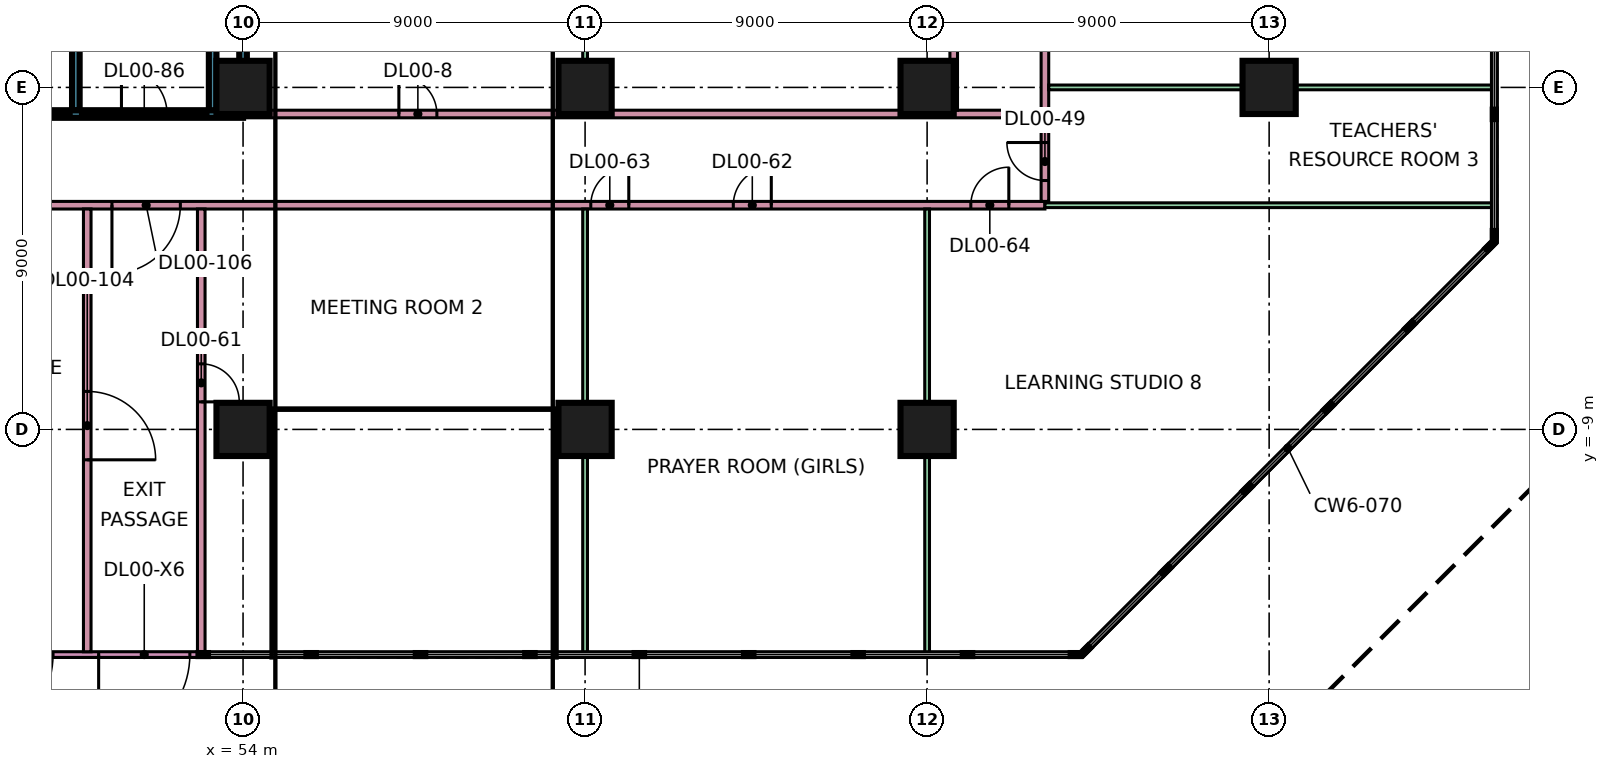
"""IFC4 building model, lengths in metres.
Left out: names, types, materials, properties, quantities, classifications, styles, units other than length and angle.
Written with IfcOpenShell. Run it as: python <this file> out.ifc"""

import sys

from ifc_helpers import new_model, si_unit, direction, frame, frame_2d, origin, origin_2d, place, context, subcontext, project, spatial, rectangle, extrude, element, fill, save


model = new_model("IFC4")
c1 = context("Model", 3, precision=1e-05, world=origin(), true_north=direction((0.0, 1.0)))
c2 = subcontext(c1, "Body", "Model", "MODEL_VIEW")
j1 = project(units=[si_unit("LENGTHUNIT", "METRE"), si_unit("PLANEANGLEUNIT", "RADIAN")], contexts=[c1])
p1 = place(None, origin())
s1 = spatial("IfcSite", under=j1, at=p1, CompositionType="ELEMENT")
p2 = place(p1, origin())
s2 = spatial("IfcBuilding", under=s1, at=p2, CompositionType="ELEMENT")
p3 = place(p2, origin())
s3 = spatial("IfcBuildingStorey", under=s2, at=p3, CompositionType="ELEMENT", Elevation=0.0)
for number, where, z_axis, x_axis in (
    (1, (54.0, -9.0, 0.0), (0.0, 0.0, 1.0), (1.0, 0.0, 0.0)),
    (2, (63.0, -9.0, 0.0), (0.0, 0.0, 1.0), (1.0, 0.0, 0.0)),
    (3, (72.0, -9.0, 0.0), (0.0, 0.0, 1.0), (1.0, 0.0, 0.0)),
    (4, (54.0, 0.0, 0.0), (0.0, 0.0, 1.0), (1.0, 0.0, 0.0)),
    (5, (63.0, 0.0, 0.0), (0.0, 0.0, 1.0), (1.0, 0.0, 0.0)),
    (6, (72.0, 0.0, 0.0), (0.0, 0.0, 1.0), (1.0, 0.0, 0.0)),
    (7, (81.0, 0.0, 0.0), (0.0, 0.0, 1.0), (1.0, 0.0, 0.0)),
):
    element("IfcColumn", number, at=place(p3, frame(where, z_axis=z_axis, x_axis=x_axis)), inside=s3, PredefinedType="COLUMN", context=c2, shape_type="SweptSolid", body=[
        extrude(rectangle(XDim=1.4, YDim=1.4, at=origin_2d()), origin(), (0.0, 0.0, 1.0), 7.2),
    ])
p4 = place(p3, frame((46.3, -14.925, 0.0), z_axis=(0.0, 0.0, 1.0), x_axis=(1.0, 0.0, 0.0)))
e8 = element("IfcWall", 8, at=p4, inside=s3, PredefinedType="SOLIDWALL", context=c2, shape_type="SweptSolid", body=[
    extrude(rectangle(XDim=6.6, YDim=0.15, at=frame_2d((3.3, 0.0))), origin(), (0.0, 0.0, 1.0), 6.8),
])
p5 = place(p4, frame((0.3, 0.0, 0.0)))
e9 = element("IfcOpeningElement", 9, at=p5, cuts=e8, PredefinedType="OPENING", context=c2, shape_type="SweptSolid", body=[
    extrude(rectangle(XDim=2.4, YDim=2.4, at=frame_2d((1.2, 1.2))), frame((0.0, 0.085, 0.0), z_axis=(0.0, -1.0, 0.0), x_axis=(1.0, 0.0, 0.0)), (0.0, 0.0, 1.0), 0.17),
])
p6 = place(p4, frame((3.9, 0.0, 0.0)))
e10 = element("IfcOpeningElement", 10, at=p6, cuts=e8, PredefinedType="OPENING", context=c2, shape_type="SweptSolid", body=[
    extrude(rectangle(XDim=2.4, YDim=2.4, at=frame_2d((1.2, 1.2))), frame((0.0, 0.085, 0.0), z_axis=(0.0, -1.0, 0.0), x_axis=(1.0, 0.0, 0.0)), (0.0, 0.0, 1.0), 0.17),
])
p7 = place(p3, frame((-3.2, -3.1, 0.0), z_axis=(0.0, 0.0, 1.0), x_axis=(1.0, 0.0, 0.0)))
e11 = element("IfcWall", 11, at=p7, inside=s3, PredefinedType="PARTITIONING", context=c2, shape_type="SweptSolid", body=[
    extrude(rectangle(XDim=78.3, YDim=0.2, at=frame_2d((39.15, 0.0))), origin(), (0.0, 0.0, 1.0), 6.8),
])
p8 = place(p7, frame((70.1, 0.0, 0.0)))
e12 = element("IfcOpeningElement", 12, at=p8, cuts=e11, PredefinedType="OPENING", context=c2, shape_type="SweptSolid", body=[
    extrude(rectangle(XDim=1.0, YDim=2.1, at=frame_2d((0.5, 1.05))), frame((0.0, 0.11, 0.0), z_axis=(0.0, -1.0, 0.0), x_axis=(1.0, 0.0, 0.0)), (0.0, 0.0, 1.0), 0.22),
])
p9 = place(p7, frame((66.35, 0.0, 0.0)))
e13 = element("IfcOpeningElement", 13, at=p9, cuts=e11, PredefinedType="OPENING", context=c2, shape_type="SweptSolid", body=[
    extrude(rectangle(XDim=1.0, YDim=2.1, at=frame_2d((0.5, 1.05))), frame((0.0, 0.11, 0.0), z_axis=(0.0, -1.0, 0.0), x_axis=(1.0, 0.0, 0.0)), (0.0, 0.0, 1.0), 0.22),
])
p10 = place(p7, frame((76.35, 0.0, 0.0)))
e14 = element("IfcOpeningElement", 14, at=p10, cuts=e11, PredefinedType="OPENING", context=c2, shape_type="SweptSolid", body=[
    extrude(rectangle(XDim=1.0, YDim=2.1, at=frame_2d((0.5, 1.05))), frame((0.0, 0.11, 0.0), z_axis=(0.0, -1.0, 0.0), x_axis=(1.0, 0.0, 0.0)), (0.0, 0.0, 1.0), 0.22),
])
p11 = place(p7, frame((8.6, 0.0, 0.0)))
e15 = element("IfcOpeningElement", 15, at=p11, cuts=e11, PredefinedType="OPENING", context=c2, shape_type="SweptSolid", body=[
    extrude(rectangle(XDim=1.0, YDim=2.1, at=frame_2d((0.5, 1.05))), frame((0.0, 0.11, 0.0), z_axis=(0.0, -1.0, 0.0), x_axis=(1.0, 0.0, 0.0)), (0.0, 0.0, 1.0), 0.22),
])
p12 = place(p7, frame((3.35, 0.0, 0.0)))
e16 = element("IfcOpeningElement", 16, at=p12, cuts=e11, PredefinedType="OPENING", context=c2, shape_type="SweptSolid", body=[
    extrude(rectangle(XDim=1.0, YDim=2.1, at=frame_2d((0.5, 1.05))), frame((0.0, 0.11, 0.0), z_axis=(0.0, -1.0, 0.0), x_axis=(1.0, 0.0, 0.0)), (0.0, 0.0, 1.0), 0.22),
])
p13 = place(p7, frame((20.6, 0.0, 0.0)))
e17 = element("IfcOpeningElement", 17, at=p13, cuts=e11, PredefinedType="OPENING", context=c2, shape_type="SweptSolid", body=[
    extrude(rectangle(XDim=1.0, YDim=2.1, at=frame_2d((0.5, 1.05))), frame((0.0, 0.11, 0.0), z_axis=(0.0, -1.0, 0.0), x_axis=(1.0, 0.0, 0.0)), (0.0, 0.0, 1.0), 0.22),
])
p14 = place(p7, frame((15.35, 0.0, 0.0)))
e18 = element("IfcOpeningElement", 18, at=p14, cuts=e11, PredefinedType="OPENING", context=c2, shape_type="SweptSolid", body=[
    extrude(rectangle(XDim=1.0, YDim=2.1, at=frame_2d((0.5, 1.05))), frame((0.0, 0.11, 0.0), z_axis=(0.0, -1.0, 0.0), x_axis=(1.0, 0.0, 0.0)), (0.0, 0.0, 1.0), 0.22),
])
p15 = place(p7, frame((32.6, 0.0, 0.0)))
e19 = element("IfcOpeningElement", 19, at=p15, cuts=e11, PredefinedType="OPENING", context=c2, shape_type="SweptSolid", body=[
    extrude(rectangle(XDim=1.0, YDim=2.1, at=frame_2d((0.5, 1.05))), frame((0.0, 0.11, 0.0), z_axis=(0.0, -1.0, 0.0), x_axis=(1.0, 0.0, 0.0)), (0.0, 0.0, 1.0), 0.22),
])
p16 = place(p7, frame((27.35, 0.0, 0.0)))
e20 = element("IfcOpeningElement", 20, at=p16, cuts=e11, PredefinedType="OPENING", context=c2, shape_type="SweptSolid", body=[
    extrude(rectangle(XDim=1.0, YDim=2.1, at=frame_2d((0.5, 1.05))), frame((0.0, 0.11, 0.0), z_axis=(0.0, -1.0, 0.0), x_axis=(1.0, 0.0, 0.0)), (0.0, 0.0, 1.0), 0.22),
])
p17 = place(p7, frame((44.85, 0.0, 0.0)))
e21 = element("IfcOpeningElement", 21, at=p17, cuts=e11, PredefinedType="OPENING", context=c2, shape_type="SweptSolid", body=[
    extrude(rectangle(XDim=1.8, YDim=2.1, at=frame_2d((0.9, 1.05))), frame((0.0, 0.11, 0.0), z_axis=(0.0, -1.0, 0.0), x_axis=(1.0, 0.0, 0.0)), (0.0, 0.0, 1.0), 0.22),
])
p18 = place(p7, frame((50.15, 0.0, 0.0)))
e22 = element("IfcOpeningElement", 22, at=p18, cuts=e11, PredefinedType="OPENING", context=c2, shape_type="SweptSolid", body=[
    extrude(rectangle(XDim=1.8, YDim=2.1, at=frame_2d((0.9, 1.05))), frame((0.0, 0.11, 0.0), z_axis=(0.0, -1.0, 0.0), x_axis=(1.0, 0.0, 0.0)), (0.0, 0.0, 1.0), 0.22),
])
p19 = place(p7, frame((53.75, 0.0, 0.0)))
e23 = element("IfcOpeningElement", 23, at=p19, cuts=e11, PredefinedType="OPENING", context=c2, shape_type="SweptSolid", body=[
    extrude(rectangle(XDim=1.8, YDim=2.1, at=frame_2d((0.9, 1.05))), frame((0.0, 0.11, 0.0), z_axis=(0.0, -1.0, 0.0), x_axis=(1.0, 0.0, 0.0)), (0.0, 0.0, 1.0), 0.22),
])
p20 = place(p3, frame((45.7, -0.7, 0.0), z_axis=(0.0, 0.0, 1.0), x_axis=(1.0, 0.0, 0.0)))
e24 = element("IfcWall", 24, at=p20, inside=s3, PredefinedType="SOLIDWALL", context=c2, shape_type="SweptSolid", body=[
    extrude(rectangle(XDim=8.3, YDim=0.2, at=frame_2d((4.15, 0.0))), origin(), (0.0, 0.0, 1.0), 6.8),
])
p21 = place(p20, frame((5.1, 0.0, 0.0)))
e25 = element("IfcOpeningElement", 25, at=p21, cuts=e24, PredefinedType="OPENING", context=c2, shape_type="SweptSolid", body=[
    extrude(rectangle(XDim=1.2, YDim=2.1, at=frame_2d((0.6, 1.05))), frame((0.0, 0.11, 0.0), z_axis=(0.0, -1.0, 0.0), x_axis=(1.0, 0.0, 0.0)), (0.0, 0.0, 1.0), 0.22),
])
p22 = place(p20, frame((1.5, 0.0, 0.0)))
e26 = element("IfcOpeningElement", 26, at=p22, cuts=e24, PredefinedType="OPENING", context=c2, shape_type="SweptSolid", body=[
    extrude(rectangle(XDim=1.2, YDim=2.1, at=frame_2d((0.6, 1.05))), frame((0.0, 0.11, 0.0), z_axis=(0.0, -1.0, 0.0), x_axis=(1.0, 0.0, 0.0)), (0.0, 0.0, 1.0), 0.22),
])
p23 = place(p3, frame((49.6, -0.6, 0.0), z_axis=(0.0, 0.0, 1.0), x_axis=(0.0, 1.0, 0.0)))
e27 = element("IfcWall", 27, at=p23, inside=s3, PredefinedType="SOLIDWALL", context=c2, shape_type="SweptSolid", body=[
    extrude(rectangle(XDim=13.1, YDim=0.2, at=frame_2d((6.55, 0.0))), origin(), (0.0, 0.0, 1.0), 6.8),
])
p24 = place(p3, frame((49.9, -14.851, 0.0), z_axis=(0.0, 0.0, 1.0), x_axis=(0.0, 1.0, 0.0)))
e28 = element("IfcWall", 28, at=p24, inside=s3, PredefinedType="PARTITIONING", context=c2, shape_type="SweptSolid", body=[
    extrude(rectangle(XDim=11.651, YDim=0.2, at=frame_2d((5.826, 0.0))), origin(), (0.0, 0.0, 1.0), 6.8),
])
p25 = place(p24, frame((5.051, 0.0, 0.0)))
e29 = element("IfcOpeningElement", 29, at=p25, cuts=e28, PredefinedType="OPENING", context=c2, shape_type="SweptSolid", body=[
    extrude(rectangle(XDim=1.8, YDim=2.1, at=frame_2d((0.9, 1.05))), frame((0.0, 0.11, 0.0), z_axis=(0.0, -1.0, 0.0), x_axis=(1.0, 0.0, 0.0)), (0.0, 0.0, 1.0), 0.22),
])
p26 = place(p3, frame((52.9, -14.925, 0.0), z_axis=(0.0, 0.0, 1.0), x_axis=(0.0, 1.0, 0.0)))
e30 = element("IfcWall", 30, at=p26, inside=s3, PredefinedType="PARTITIONING", context=c2, shape_type="SweptSolid", body=[
    extrude(rectangle(XDim=11.725, YDim=0.2, at=frame_2d((5.863, 0.0))), origin(), (0.0, 0.0, 1.0), 6.8),
])
p27 = place(p26, frame((6.65, 0.0, 0.0)))
e31 = element("IfcOpeningElement", 31, at=p27, cuts=e30, PredefinedType="OPENING", context=c2, shape_type="SweptSolid", body=[
    extrude(rectangle(XDim=1.0, YDim=2.1, at=frame_2d((0.5, 1.05))), frame((0.0, 0.11, 0.0), z_axis=(0.0, -1.0, 0.0), x_axis=(1.0, 0.0, 0.0)), (0.0, 0.0, 1.0), 0.22),
])
p28 = place(p3, frame((54.0, -0.7, 0.0), z_axis=(0.0, 0.0, 1.0), x_axis=(1.0, 0.0, 0.0)))
e32 = element("IfcWall", 32, at=p28, inside=s3, PredefinedType="PARTITIONING", context=c2, shape_type="SweptSolid", body=[
    extrude(rectangle(XDim=21.0, YDim=0.2, at=frame_2d((10.5, 0.0))), origin(), (0.0, 0.0, 1.0), 6.8),
])
p29 = place(p28, frame((4.1, 0.0, 0.0)))
e33 = element("IfcOpeningElement", 33, at=p29, cuts=e32, PredefinedType="OPENING", context=c2, shape_type="SweptSolid", body=[
    extrude(rectangle(XDim=1.0, YDim=2.1, at=frame_2d((0.5, 1.05))), frame((0.0, 0.11, 0.0), z_axis=(0.0, -1.0, 0.0), x_axis=(1.0, 0.0, 0.0)), (0.0, 0.0, 1.0), 0.22),
])
p30 = place(p3, frame((54.0, -0.6, 0.0), z_axis=(0.0, 0.0, 1.0), x_axis=(0.0, 1.0, 0.0)))
e34 = element("IfcWall", 34, at=p30, inside=s3, PredefinedType="SOLIDWALL", context=c2, shape_type="SweptSolid", body=[
    extrude(rectangle(XDim=13.1, YDim=0.2, at=frame_2d((6.55, 0.0))), origin(), (0.0, 0.0, 1.0), 6.8),
])
p31 = place(p3, frame((63.0, -14.925, 0.0), z_axis=(0.0, 0.0, 1.0), x_axis=(0.0, 1.0, 0.0)))
e35 = element("IfcWall", 35, at=p31, inside=s3, PredefinedType="PARTITIONING", context=c2, shape_type="SweptSolid", body=[
    extrude(rectangle(XDim=11.725, YDim=0.125, at=frame_2d((5.863, 0.0))), origin(), (0.0, 0.0, 1.0), 6.8),
])
p32 = place(p3, frame((63.0, -0.6, 0.0), z_axis=(0.0, 0.0, 1.0), x_axis=(0.0, 1.0, 0.0)))
e36 = element("IfcWall", 36, at=p32, inside=s3, PredefinedType="PARTITIONING", context=c2, shape_type="SweptSolid", body=[
    extrude(rectangle(XDim=6.538, YDim=0.125, at=frame_2d((3.269, 0.0))), origin(), (0.0, 0.0, 1.0), 6.8),
])
p33 = place(p3, frame((72.0, -14.925, 0.0), z_axis=(0.0, 0.0, 1.0), x_axis=(0.0, 1.0, 0.0)))
e37 = element("IfcWall", 37, at=p33, inside=s3, PredefinedType="PARTITIONING", context=c2, shape_type="SweptSolid", body=[
    extrude(rectangle(XDim=11.725, YDim=0.125, at=frame_2d((5.863, 0.0))), origin(), (0.0, 0.0, 1.0), 6.8),
])
p34 = place(p3, frame((72.7, -0.6, 0.0), z_axis=(0.0, 0.0, 1.0), x_axis=(0.0, 1.0, 0.0)))
e38 = element("IfcWall", 38, at=p34, inside=s3, PredefinedType="PARTITIONING", context=c2, shape_type="SweptSolid", body=[
    extrude(rectangle(XDim=13.1, YDim=0.2, at=frame_2d((6.55, 0.0))), origin(), (0.0, 0.0, 1.0), 6.8),
])
p35 = place(p34, frame((6.05, 0.0, 0.0)))
e39 = element("IfcOpeningElement", 39, at=p35, cuts=e38, PredefinedType="OPENING", context=c2, shape_type="SweptSolid", body=[
    extrude(rectangle(XDim=1.0, YDim=2.1, at=frame_2d((0.5, 1.05))), frame((0.0, 0.11, 0.0), z_axis=(0.0, -1.0, 0.0), x_axis=(1.0, 0.0, 0.0)), (0.0, 0.0, 1.0), 0.22),
])
p36 = place(p3, frame((75.1, -3.1, 0.0), z_axis=(0.0, 0.0, 1.0), x_axis=(1.0, 0.0, 0.0)))
e40 = element("IfcWall", 40, at=p36, inside=s3, PredefinedType="PARTITIONING", context=c2, shape_type="SweptSolid", body=[
    extrude(rectangle(XDim=11.825, YDim=0.125, at=frame_2d((5.913, 0.0))), origin(), (0.0, 0.0, 1.0), 6.8),
])
p37 = place(p3, frame((75.1, -3.0, 0.0), z_axis=(0.0, 0.0, 1.0), x_axis=(0.0, 1.0, 0.0)))
e41 = element("IfcWall", 41, at=p37, inside=s3, PredefinedType="PARTITIONING", context=c2, shape_type="SweptSolid", body=[
    extrude(rectangle(XDim=30.0, YDim=0.2, at=frame_2d((15.0, 0.0))), origin(), (0.0, 0.0, 1.0), 6.8),
])
p38 = place(p37, frame((0.55, 0.0, 0.0)))
e42 = element("IfcOpeningElement", 42, at=p38, cuts=e41, PredefinedType="OPENING", context=c2, shape_type="SweptSolid", body=[
    extrude(rectangle(XDim=1.0, YDim=2.1, at=frame_2d((0.5, 1.05))), frame((0.0, 0.11, 0.0), z_axis=(0.0, -1.0, 0.0), x_axis=(1.0, 0.0, 0.0)), (0.0, 0.0, 1.0), 0.22),
])
p39 = place(p37, frame((8.4, 0.0, 0.0)))
e43 = element("IfcOpeningElement", 43, at=p39, cuts=e41, PredefinedType="OPENING", context=c2, shape_type="SweptSolid", body=[
    extrude(rectangle(XDim=1.0, YDim=2.1, at=frame_2d((0.5, 1.05))), frame((0.0, 0.11, 0.0), z_axis=(0.0, -1.0, 0.0), x_axis=(1.0, 0.0, 0.0)), (0.0, 0.0, 1.0), 0.22),
])
p40 = place(p37, frame((22.25, 0.0, 0.0)))
e44 = element("IfcOpeningElement", 44, at=p40, cuts=e41, PredefinedType="OPENING", context=c2, shape_type="SweptSolid", body=[
    extrude(rectangle(XDim=1.0, YDim=2.1, at=frame_2d((0.5, 1.05))), frame((0.0, 0.11, 0.0), z_axis=(0.0, -1.0, 0.0), x_axis=(1.0, 0.0, 0.0)), (0.0, 0.0, 1.0), 0.22),
])
p41 = place(p37, frame((28.35, 0.0, 0.0)))
e45 = element("IfcOpeningElement", 45, at=p41, cuts=e41, PredefinedType="OPENING", context=c2, shape_type="SweptSolid", body=[
    extrude(rectangle(XDim=1.0, YDim=2.1, at=frame_2d((0.5, 1.05))), frame((0.0, 0.11, 0.0), z_axis=(0.0, -1.0, 0.0), x_axis=(1.0, 0.0, 0.0)), (0.0, 0.0, 1.0), 0.22),
])
p42 = place(p37, frame((16.25, 0.0, 0.0)))
e46 = element("IfcOpeningElement", 46, at=p42, cuts=e41, PredefinedType="OPENING", context=c2, shape_type="SweptSolid", body=[
    extrude(rectangle(XDim=1.8, YDim=2.1, at=frame_2d((0.9, 1.05))), frame((0.0, 0.11, 0.0), z_axis=(0.0, -1.0, 0.0), x_axis=(1.0, 0.0, 0.0)), (0.0, 0.0, 1.0), 0.22),
])
p43 = place(p3, frame((75.2, 0.0, 0.0), z_axis=(0.0, 0.0, 1.0), x_axis=(1.0, 0.0, 0.0)))
e47 = element("IfcWall", 47, at=p43, inside=s3, PredefinedType="PARTITIONING", context=c2, shape_type="SweptSolid", body=[
    extrude(rectangle(XDim=11.725, YDim=0.125, at=frame_2d((5.863, 0.0))), origin(), (0.0, 0.0, 1.0), 6.8),
])
p44 = place(p3, frame((53.2, -0.6, 0.0), z_axis=(0.0, 0.0, 1.0), x_axis=(0.0, 1.0, 0.0)))
e48 = element("IfcWall", 48, at=p44, inside=s3, PredefinedType="SOLIDWALL", context=c2, shape_type="SweptSolid", body=[
    extrude(rectangle(XDim=5.985, YDim=0.2, at=frame_2d((2.993, 0.0))), origin(), (0.0, 0.0, 1.0), 6.8),
])
p45 = place(p5, frame((2.4, 0.0, 0.0), z_axis=(0.0, 0.0, 1.0), x_axis=(-1.0, 0.0, 0.0)))
e49 = element("IfcDoor", 49, at=p45, inside=s3, OperationType="DOUBLE_DOOR_SINGLE_SWING", PredefinedType="DOOR", context=c2, shape_type="SweptSolid", body=[
    extrude(rectangle(XDim=2.4, YDim=2.4, at=frame_2d((1.2, 1.2))), frame((0.0, 0.025, 0.0), z_axis=(0.0, -1.0, 0.0), x_axis=(1.0, 0.0, 0.0)), (0.0, 0.0, 1.0), 0.05),
])
fill(e9, e49)
p46 = place(p6, frame((2.4, 0.0, 0.0), z_axis=(0.0, 0.0, 1.0), x_axis=(-1.0, 0.0, 0.0)))
e50 = element("IfcDoor", 50, at=p46, inside=s3, OperationType="DOUBLE_DOOR_SINGLE_SWING", PredefinedType="DOOR", context=c2, shape_type="SweptSolid", body=[
    extrude(rectangle(XDim=2.4, YDim=2.4, at=frame_2d((1.2, 1.2))), frame((0.0, 0.025, 0.0), z_axis=(0.0, -1.0, 0.0), x_axis=(1.0, 0.0, 0.0)), (0.0, 0.0, 1.0), 0.05),
])
fill(e10, e50)
p47 = place(p29, origin())
e51 = element("IfcDoor", 51, at=p47, inside=s3, OperationType="SINGLE_SWING_LEFT", PredefinedType="DOOR", context=c2, shape_type="SweptSolid", body=[
    extrude(rectangle(XDim=1.0, YDim=2.1, at=frame_2d((0.5, 1.05))), frame((0.0, 0.025, 0.0), z_axis=(0.0, -1.0, 0.0), x_axis=(1.0, 0.0, 0.0)), (0.0, 0.0, 1.0), 0.05),
])
fill(e33, e51)
p48 = place(p38, frame((1.0, 0.0, 0.0), z_axis=(0.0, 0.0, 1.0), x_axis=(-1.0, 0.0, 0.0)))
e52 = element("IfcDoor", 52, at=p48, inside=s3, OperationType="SINGLE_SWING_RIGHT", PredefinedType="DOOR", context=c2, shape_type="SweptSolid", body=[
    extrude(rectangle(XDim=1.0, YDim=2.1, at=frame_2d((0.5, 1.05))), frame((0.0, 0.025, 0.0), z_axis=(0.0, -1.0, 0.0), x_axis=(1.0, 0.0, 0.0)), (0.0, 0.0, 1.0), 0.05),
])
fill(e42, e52)
p49 = place(p27, frame((1.0, 0.0, 0.0), z_axis=(0.0, 0.0, 1.0), x_axis=(-1.0, 0.0, 0.0)))
e53 = element("IfcDoor", 53, at=p49, inside=s3, OperationType="SINGLE_SWING_LEFT", PredefinedType="DOOR", context=c2, shape_type="SweptSolid", body=[
    extrude(rectangle(XDim=1.0, YDim=2.1, at=frame_2d((0.5, 1.05))), frame((0.0, 0.025, 0.0), z_axis=(0.0, -1.0, 0.0), x_axis=(1.0, 0.0, 0.0)), (0.0, 0.0, 1.0), 0.05),
])
fill(e31, e53)
p50 = place(p8, frame((1.0, 0.0, 0.0), z_axis=(0.0, 0.0, 1.0), x_axis=(-1.0, 0.0, 0.0)))
e54 = element("IfcDoor", 54, at=p50, inside=s3, OperationType="SINGLE_SWING_RIGHT", PredefinedType="DOOR", context=c2, shape_type="SweptSolid", body=[
    extrude(rectangle(XDim=1.0, YDim=2.1, at=frame_2d((0.5, 1.05))), frame((0.0, 0.025, 0.0), z_axis=(0.0, -1.0, 0.0), x_axis=(1.0, 0.0, 0.0)), (0.0, 0.0, 1.0), 0.05),
])
fill(e12, e54)
p51 = place(p9, frame((1.0, 0.0, 0.0), z_axis=(0.0, 0.0, 1.0), x_axis=(-1.0, 0.0, 0.0)))
e55 = element("IfcDoor", 55, at=p51, inside=s3, OperationType="SINGLE_SWING_RIGHT", PredefinedType="DOOR", context=c2, shape_type="SweptSolid", body=[
    extrude(rectangle(XDim=1.0, YDim=2.1, at=frame_2d((0.5, 1.05))), frame((0.0, 0.025, 0.0), z_axis=(0.0, -1.0, 0.0), x_axis=(1.0, 0.0, 0.0)), (0.0, 0.0, 1.0), 0.05),
])
fill(e13, e55)
p52 = place(p10, frame((1.0, 0.0, 0.0), z_axis=(0.0, 0.0, 1.0), x_axis=(-1.0, 0.0, 0.0)))
e56 = element("IfcDoor", 56, at=p52, inside=s3, OperationType="SINGLE_SWING_RIGHT", PredefinedType="DOOR", context=c2, shape_type="SweptSolid", body=[
    extrude(rectangle(XDim=1.0, YDim=2.1, at=frame_2d((0.5, 1.05))), frame((0.0, 0.025, 0.0), z_axis=(0.0, -1.0, 0.0), x_axis=(1.0, 0.0, 0.0)), (0.0, 0.0, 1.0), 0.05),
])
fill(e14, e56)
p53 = place(p21, origin())
e57 = element("IfcDoor", 57, at=p53, inside=s3, OperationType="SINGLE_SWING_LEFT", PredefinedType="DOOR", context=c2, shape_type="SweptSolid", body=[
    extrude(rectangle(XDim=1.2, YDim=2.1, at=frame_2d((0.6, 1.05))), frame((0.0, 0.025, 0.0), z_axis=(0.0, -1.0, 0.0), x_axis=(1.0, 0.0, 0.0)), (0.0, 0.0, 1.0), 0.05),
])
fill(e25, e57)
p54 = place(p25, frame((1.8, 0.0, 0.0), z_axis=(0.0, 0.0, 1.0), x_axis=(-1.0, 0.0, 0.0)))
e58 = element("IfcDoor", 58, at=p54, inside=s3, OperationType="DOUBLE_DOOR_SINGLE_SWING", PredefinedType="DOOR", context=c2, shape_type="SweptSolid", body=[
    extrude(rectangle(XDim=1.8, YDim=2.1, at=frame_2d((0.9, 1.05))), frame((0.0, 0.025, 0.0), z_axis=(0.0, -1.0, 0.0), x_axis=(1.0, 0.0, 0.0)), (0.0, 0.0, 1.0), 0.05),
])
fill(e29, e58)
p55 = place(p19, frame((1.8, 0.0, 0.0), z_axis=(0.0, 0.0, 1.0), x_axis=(-1.0, 0.0, 0.0)))
e59 = element("IfcDoor", 59, at=p55, inside=s3, OperationType="DOUBLE_DOOR_SINGLE_SWING", PredefinedType="DOOR", context=c2, shape_type="SweptSolid", body=[
    extrude(rectangle(XDim=1.8, YDim=2.1, at=frame_2d((0.9, 1.05))), frame((0.0, 0.025, 0.0), z_axis=(0.0, -1.0, 0.0), x_axis=(1.0, 0.0, 0.0)), (0.0, 0.0, 1.0), 0.05),
])
fill(e23, e59)
save(model, sys.argv[1])
